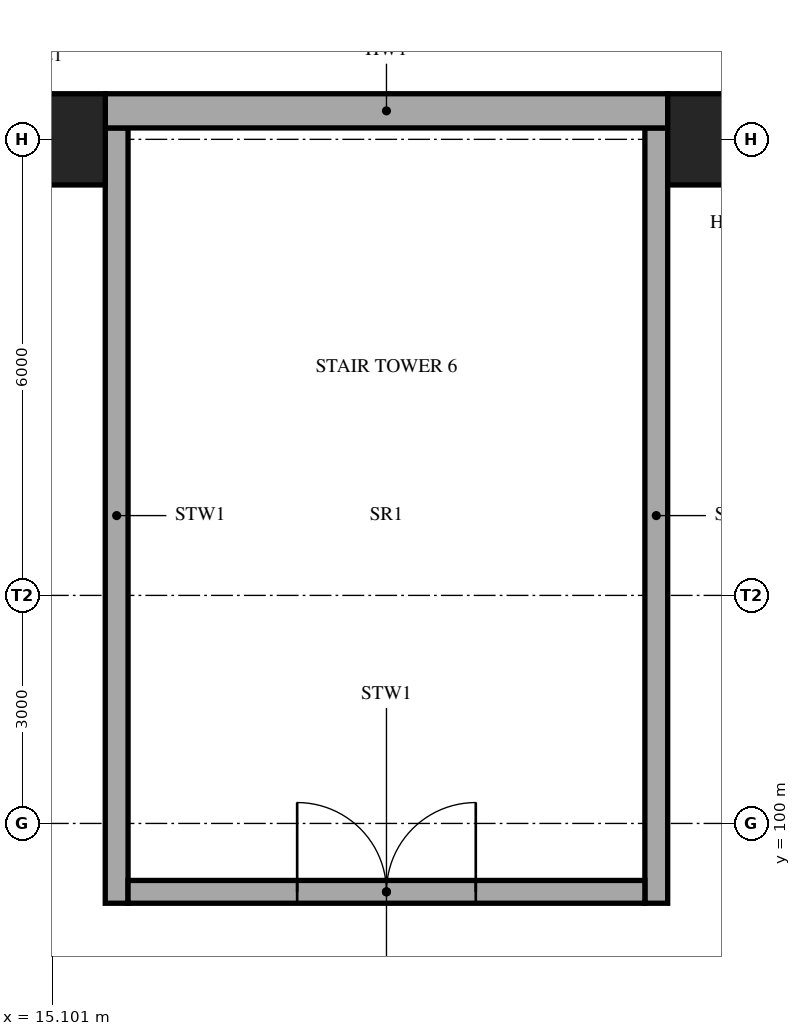
"""IFC4 building model, lengths in metres.
Left out: names, types, materials, properties, quantities, classifications, styles, units other than length and angle.
Written with IfcOpenShell. Run it as: python <this file> out.ifc"""

import sys

from ifc_helpers import new_model, si_unit, direction, frame, frame_2d, origin, origin_2d, place, context, subcontext, project, spatial, rectangle, extrude, element, fill, save


model = new_model("IFC4")
c1 = context("Model", 3, precision=1e-05, world=origin(), true_north=direction((0.0, 1.0)))
c2 = subcontext(c1, "Body", "Model", "MODEL_VIEW")
j1 = project(units=[si_unit("LENGTHUNIT", "METRE"), si_unit("PLANEANGLEUNIT", "RADIAN")], contexts=[c1])
p1 = place(None, origin())
s1 = spatial("IfcSite", under=j1, at=p1, CompositionType="ELEMENT")
p2 = place(p1, origin())
s2 = spatial("IfcBuilding", under=s1, at=p2, CompositionType="ELEMENT")
p3 = place(p2, frame((0.0, 0.0, 15.0)))
s3 = spatial("IfcBuildingStorey", under=s2, at=p3, CompositionType="ELEMENT", Elevation=15.0)
for number, where, z_axis, x_axis in (
    (1, (15.0, 109.0, 0.0), (0.0, 0.0, 1.0), (1.0, 0.0, 0.0)),
    (2, (24.0, 109.0, 0.0), (0.0, 0.0, 1.0), (1.0, 0.0, 0.0)),
):
    element("IfcColumn", number, at=place(p3, frame(where, z_axis=z_axis, x_axis=x_axis)), inside=s3, PredefinedType="COLUMN", context=c2, shape_type="SweptSolid", body=[
        extrude(rectangle(XDim=1.6, YDim=1.2, at=origin_2d()), origin(), (0.0, 0.0, 1.0), 4.2),
    ])
for number, where, z_axis, x_axis in (
    (3, (15.95, 109.15, 0.0), (0.0, 0.0, 1.0), (0.0, -1.0, 0.0)),
    (4, (23.05, 109.15, 0.0), (0.0, 0.0, 1.0), (0.0, -1.0, 0.0)),
):
    element("IfcWall", number, at=place(p3, frame(where, z_axis=z_axis, x_axis=x_axis)), inside=s3, PredefinedType="SHEAR", context=c2, shape_type="SweptSolid", body=[
        extrude(rectangle(XDim=10.2, YDim=0.3, at=frame_2d((5.1, 0.0))), origin(), (0.0, 0.0, 1.0), 3.9),
    ])
p4 = place(p3, frame((16.1, 99.1, 0.0), z_axis=(0.0, 0.0, 1.0), x_axis=(1.0, 0.0, 0.0)))
e5 = element("IfcWall", 5, at=p4, inside=s3, PredefinedType="SHEAR", context=c2, shape_type="SweptSolid", body=[
    extrude(rectangle(XDim=6.8, YDim=0.3, at=frame_2d((3.4, 0.0))), origin(), (0.0, 0.0, 1.0), 3.9),
])
p5 = place(p4, frame((2.225, 0.0, 0.0)))
e6 = element("IfcOpeningElement", 6, at=p5, cuts=e5, PredefinedType="OPENING", context=c2, shape_type="SweptSolid", body=[
    extrude(rectangle(XDim=2.35, YDim=2.1, at=frame_2d((1.175, 1.05))), frame((0.0, 0.16, 0.0), z_axis=(0.0, -1.0, 0.0), x_axis=(1.0, 0.0, 0.0)), (0.0, 0.0, 1.0), 0.32),
])
p6 = place(p3, frame((15.8, 109.375, 0.0), z_axis=(0.0, 0.0, 1.0), x_axis=(1.0, 0.0, 0.0)))
e7 = element("IfcWall", 7, at=p6, inside=s3, PredefinedType="SOLIDWALL", context=c2, shape_type="SweptSolid", body=[
    extrude(rectangle(XDim=7.4, YDim=0.45, at=frame_2d((3.7, 0.0))), origin(), (0.0, 0.0, 1.0), 4.2),
])
p7 = place(p5, origin())
e8 = element("IfcDoor", 8, at=p7, inside=s3, OperationType="DOUBLE_DOOR_SINGLE_SWING", PredefinedType="DOOR", context=c2, shape_type="SweptSolid", body=[
    extrude(rectangle(XDim=2.35, YDim=2.1, at=frame_2d((1.175, 1.05))), frame((0.0, 0.025, 0.0), z_axis=(0.0, -1.0, 0.0), x_axis=(1.0, 0.0, 0.0)), (0.0, 0.0, 1.0), 0.05),
])
fill(e6, e8)
save(model, sys.argv[1])
